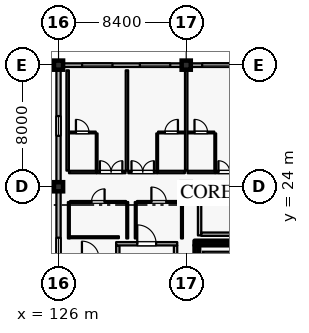
"""IFC4 building model, lengths in metres.
Left out: names, types, materials, properties, quantities, classifications, styles, units other than length and angle.
Written with IfcOpenShell. Run it as: python <this file> out.ifc"""

import sys

from ifc_helpers import new_model, si_unit, direction, frame, frame_2d, origin, origin_2d, place, context, subcontext, project, spatial, rectangle, extrude, element, fill, save


model = new_model("IFC4")
c1 = context("Model", 3, precision=1e-05, world=origin(), true_north=direction((0.0, 1.0)))
c2 = subcontext(c1, "Body", "Model", "MODEL_VIEW")
j1 = project(units=[si_unit("LENGTHUNIT", "METRE"), si_unit("PLANEANGLEUNIT", "RADIAN")], contexts=[c1])
p1 = place(None, origin())
s1 = spatial("IfcSite", under=j1, at=p1, CompositionType="ELEMENT")
p2 = place(p1, origin())
s2 = spatial("IfcBuilding", under=s1, at=p2, CompositionType="ELEMENT")
p3 = place(p2, frame((0.0, 0.0, 47.4)))
s3 = spatial("IfcBuildingStorey", under=s2, at=p3, CompositionType="ELEMENT", Elevation=47.4)
for number, where, z_axis, x_axis in (
    (1, (126.0, 32.0, 0.0), (0.0, 0.0, 1.0), (1.0, 0.0, 0.0)),
    (2, (134.4, 32.0, 0.0), (0.0, 0.0, 1.0), (1.0, 0.0, 0.0)),
    (3, (126.0, 24.0, 0.0), (0.0, 0.0, 1.0), (1.0, 0.0, 0.0)),
    (4, (134.4, 24.0, 0.0), (0.0, 0.0, 1.0), (1.0, 0.0, 0.0)),
):
    element("IfcColumn", number, at=place(p3, frame(where, z_axis=z_axis, x_axis=x_axis)), inside=s3, PredefinedType="COLUMN", context=c2, shape_type="SweptSolid", body=[
        extrude(rectangle(XDim=0.6, YDim=0.6, at=origin_2d()), origin(), (0.0, 0.0, 1.0), 4.2),
    ])
p4 = place(p3, frame((126.3, 32.0, 0.0), z_axis=(0.0, 0.0, 1.0), x_axis=(1.0, 0.0, 0.0)))
e5 = element("IfcWall", 5, at=p4, inside=s3, PredefinedType="SOLIDWALL", context=c2, shape_type="SweptSolid", body=[
    extrude(rectangle(XDim=7.8, YDim=0.24, at=frame_2d((3.9, 0.0))), origin(), (0.0, 0.0, 1.0), 3.49),
])
p5 = place(p4, frame((1.25, 0.0, 0.8)))
e6 = element("IfcOpeningElement", 6, at=p5, cuts=e5, PredefinedType="OPENING", context=c2, shape_type="SweptSolid", body=[
    extrude(rectangle(XDim=2.0, YDim=1.75, at=frame_2d((1.0, 0.875))), frame((0.0, 0.13, 0.0), z_axis=(0.0, -1.0, 0.0), x_axis=(1.0, 0.0, 0.0)), (0.0, 0.0, 1.0), 0.26),
])
p6 = place(p4, frame((5.05, 0.0, 0.8)))
e7 = element("IfcOpeningElement", 7, at=p6, cuts=e5, PredefinedType="OPENING", context=c2, shape_type="SweptSolid", body=[
    extrude(rectangle(XDim=2.0, YDim=1.75, at=frame_2d((1.0, 0.875))), frame((0.0, 0.13, 0.0), z_axis=(0.0, -1.0, 0.0), x_axis=(1.0, 0.0, 0.0)), (0.0, 0.0, 1.0), 0.26),
])
p7 = place(p3, frame((134.7, 32.0, 0.0), z_axis=(0.0, 0.0, 1.0), x_axis=(1.0, 0.0, 0.0)))
e8 = element("IfcWall", 8, at=p7, inside=s3, PredefinedType="SOLIDWALL", context=c2, shape_type="SweptSolid", body=[
    extrude(rectangle(XDim=7.8, YDim=0.24, at=frame_2d((3.9, 0.0))), origin(), (0.0, 0.0, 1.0), 3.49),
])
p8 = place(p7, frame((0.75, 0.0, 0.8)))
e9 = element("IfcOpeningElement", 9, at=p8, cuts=e8, PredefinedType="OPENING", context=c2, shape_type="SweptSolid", body=[
    extrude(rectangle(XDim=2.0, YDim=1.75, at=frame_2d((1.0, 0.875))), frame((0.0, 0.13, 0.0), z_axis=(0.0, -1.0, 0.0), x_axis=(1.0, 0.0, 0.0)), (0.0, 0.0, 1.0), 0.26),
])
p9 = place(p7, frame((4.55, 0.0, 0.8)))
e10 = element("IfcOpeningElement", 10, at=p9, cuts=e8, PredefinedType="OPENING", context=c2, shape_type="SweptSolid", body=[
    extrude(rectangle(XDim=2.0, YDim=1.75, at=frame_2d((1.0, 0.875))), frame((0.0, 0.13, 0.0), z_axis=(0.0, -1.0, 0.0), x_axis=(1.0, 0.0, 0.0)), (0.0, 0.0, 1.0), 0.26),
])
p10 = place(p3, frame((126.0, 16.3, 0.0), z_axis=(0.0, 0.0, 1.0), x_axis=(0.0, 1.0, 0.0)))
e11 = element("IfcWall", 11, at=p10, inside=s3, PredefinedType="SOLIDWALL", context=c2, shape_type="SweptSolid", body=[
    extrude(rectangle(XDim=7.4, YDim=0.28, at=frame_2d((3.7, 0.0))), origin(), (0.0, 0.0, 1.0), 3.3),
])
p11 = place(p10, frame((3.05, 0.0, 0.75)))
e12 = element("IfcOpeningElement", 12, at=p11, cuts=e11, PredefinedType="OPENING", context=c2, shape_type="SweptSolid", body=[
    extrude(rectangle(XDim=1.3, YDim=1.65, at=frame_2d((0.65, 0.825))), frame((0.0, 0.15, 0.0), z_axis=(0.0, -1.0, 0.0), x_axis=(1.0, 0.0, 0.0)), (0.0, 0.0, 1.0), 0.3),
])
p12 = place(p3, frame((126.0, 24.3, 0.0), z_axis=(0.0, 0.0, 1.0), x_axis=(0.0, 1.0, 0.0)))
e13 = element("IfcWall", 13, at=p12, inside=s3, PredefinedType="SOLIDWALL", context=c2, shape_type="SweptSolid", body=[
    extrude(rectangle(XDim=7.4, YDim=0.28, at=frame_2d((3.7, 0.0))), origin(), (0.0, 0.0, 1.0), 3.3),
])
p13 = place(p12, frame((3.05, 0.0, 0.75)))
e14 = element("IfcOpeningElement", 14, at=p13, cuts=e13, PredefinedType="OPENING", context=c2, shape_type="SweptSolid", body=[
    extrude(rectangle(XDim=1.3, YDim=1.65, at=frame_2d((0.65, 0.825))), frame((0.0, 0.15, 0.0), z_axis=(0.0, -1.0, 0.0), x_axis=(1.0, 0.0, 0.0)), (0.0, 0.0, 1.0), 0.3),
])
p14 = place(p3, frame((138.05, 20.3, 0.0), z_axis=(0.0, 0.0, 1.0), x_axis=(-1.0, 0.0, 0.0)))
e15 = element("IfcWall", 15, at=p14, inside=s3, PredefinedType="SHEAR", context=c2, shape_type="SweptSolid", body=[
    extrude(rectangle(XDim=3.1, YDim=0.3, at=frame_2d((1.55, 0.0))), origin(), (0.0, 0.0, 1.0), 3.935),
])
p15 = place(p3, frame((135.1, 20.145, 0.0), z_axis=(0.0, 0.0, 1.0), x_axis=(0.0, -1.0, 0.0)))
e16 = element("IfcWall", 16, at=p15, inside=s3, PredefinedType="SHEAR", context=c2, shape_type="SweptSolid", body=[
    extrude(rectangle(XDim=2.59, YDim=0.3, at=frame_2d((1.295, 0.0))), origin(), (0.0, 0.0, 1.0), 3.935),
])
p16 = place(p3, frame((129.9, 19.415, 0.0), z_axis=(0.0, 0.0, 1.0), x_axis=(0.0, 1.0, 0.0)))
e17 = element("IfcWall", 17, at=p16, inside=s3, PredefinedType="PARTITIONING", context=c2, shape_type="SweptSolid", body=[
    extrude(rectangle(XDim=0.72, YDim=0.22, at=frame_2d((0.36, 0.0))), origin(), (0.0, 0.0, 1.0), 3.935),
])
p17 = place(p3, frame((133.7, 16.605, 0.0), z_axis=(0.0, 0.0, 1.0), x_axis=(0.0, 1.0, 0.0)))
e18 = element("IfcWall", 18, at=p17, inside=s3, PredefinedType="PARTITIONING", context=c2, shape_type="SweptSolid", body=[
    extrude(rectangle(XDim=3.53, YDim=0.22, at=frame_2d((1.765, 0.0))), origin(), (0.0, 0.0, 1.0), 3.935),
])
p18 = place(p3, frame((129.79, 20.25, 0.0), z_axis=(0.0, 0.0, 1.0), x_axis=(1.0, 0.0, 0.0)))
e19 = element("IfcWall", 19, at=p18, inside=s3, PredefinedType="PARTITIONING", context=c2, shape_type="SweptSolid", body=[
    extrude(rectangle(XDim=4.02, YDim=0.22, at=frame_2d((2.01, 0.0))), origin(), (0.0, 0.0, 1.0), 3.935),
])
p19 = place(p18, frame((1.39, 0.0, 0.0)))
e20 = element("IfcOpeningElement", 20, at=p19, cuts=e19, PredefinedType="OPENING", context=c2, shape_type="SweptSolid", body=[
    extrude(rectangle(XDim=1.24, YDim=2.2, at=frame_2d((0.62, 1.1))), frame((0.0, 0.12, 0.0), z_axis=(0.0, -1.0, 0.0), x_axis=(1.0, 0.0, 0.0)), (0.0, 0.0, 1.0), 0.24),
])
p20 = place(p3, frame((126.69, 24.97, 0.0), z_axis=(0.0, 0.0, 1.0), x_axis=(1.0, 0.0, 0.0)))
e21 = element("IfcWall", 21, at=p20, inside=s3, PredefinedType="PARTITIONING", context=c2, shape_type="SweptSolid", body=[
    extrude(rectangle(XDim=1.81, YDim=0.16, at=frame_2d((0.905, 0.0))), origin(), (0.0, 0.0, 1.0), 3.935),
])
p21 = place(p3, frame((128.51, 24.97, 0.0), z_axis=(0.0, 0.0, 1.0), x_axis=(1.0, 0.0, 0.0)))
e22 = element("IfcWall", 22, at=p21, inside=s3, PredefinedType="PARTITIONING", context=c2, shape_type="SweptSolid", body=[
    extrude(rectangle(XDim=1.9, YDim=0.16, at=frame_2d((0.95, 0.0))), origin(), (0.0, 0.0, 1.0), 3.935),
])
p22 = place(p21, frame((0.21, 0.0, 0.0)))
e23 = element("IfcOpeningElement", 23, at=p22, cuts=e22, PredefinedType="OPENING", context=c2, shape_type="SweptSolid", body=[
    extrude(rectangle(XDim=1.48, YDim=2.35, at=frame_2d((0.74, 1.175))), frame((0.0, 0.09, 0.0), z_axis=(0.0, -1.0, 0.0), x_axis=(1.0, 0.0, 0.0)), (0.0, 0.0, 1.0), 0.18),
])
p23 = place(p3, frame((128.51, 25.06, 0.0), z_axis=(0.0, 0.0, 1.0), x_axis=(0.0, 1.0, 0.0)))
e24 = element("IfcWall", 24, at=p23, inside=s3, PredefinedType="PARTITIONING", context=c2, shape_type="SweptSolid", body=[
    extrude(rectangle(XDim=2.45, YDim=0.115, at=frame_2d((1.225, 0.0))), origin(), (0.0, 0.0, 1.0), 3.935),
])
p24 = place(p3, frame((126.7, 27.57, 0.0), z_axis=(0.0, 0.0, 1.0), x_axis=(1.0, 0.0, 0.0)))
e25 = element("IfcWall", 25, at=p24, inside=s3, PredefinedType="PARTITIONING", context=c2, shape_type="SweptSolid", body=[
    extrude(rectangle(XDim=1.75, YDim=0.115, at=frame_2d((0.875, 0.0))), origin(), (0.0, 0.0, 1.0), 3.935),
])
p25 = place(p24, frame((0.445, 0.0, 0.0)))
e26 = element("IfcOpeningElement", 26, at=p25, cuts=e25, PredefinedType="OPENING", context=c2, shape_type="SweptSolid", body=[
    extrude(rectangle(XDim=0.86, YDim=2.12, at=frame_2d((0.43, 1.06))), frame((0.0, 0.067, 0.0), z_axis=(0.0, -1.0, 0.0), x_axis=(1.0, 0.0, 0.0)), (0.0, 0.0, 1.0), 0.135),
])
p26 = place(p3, frame((126.6, 25.06, 0.0), z_axis=(0.0, 0.0, 1.0), x_axis=(0.0, 1.0, 0.0)))
e27 = element("IfcWall", 27, at=p26, inside=s3, PredefinedType="PARTITIONING", context=c2, shape_type="SweptSolid", body=[
    extrude(rectangle(XDim=6.6, YDim=0.16, at=frame_2d((3.3, 0.0))), origin(), (0.0, 0.0, 1.0), 3.935),
])
p27 = place(p3, frame((130.59, 24.97, 0.0), z_axis=(0.0, 0.0, 1.0), x_axis=(1.0, 0.0, 0.0)))
e28 = element("IfcWall", 28, at=p27, inside=s3, PredefinedType="PARTITIONING", context=c2, shape_type="SweptSolid", body=[
    extrude(rectangle(XDim=1.9, YDim=0.16, at=frame_2d((0.95, 0.0))), origin(), (0.0, 0.0, 1.0), 3.935),
])
p28 = place(p27, frame((0.21, 0.0, 0.0)))
e29 = element("IfcOpeningElement", 29, at=p28, cuts=e28, PredefinedType="OPENING", context=c2, shape_type="SweptSolid", body=[
    extrude(rectangle(XDim=1.48, YDim=2.35, at=frame_2d((0.74, 1.175))), frame((0.0, 0.09, 0.0), z_axis=(0.0, -1.0, 0.0), x_axis=(1.0, 0.0, 0.0)), (0.0, 0.0, 1.0), 0.18),
])
p29 = place(p3, frame((132.5, 24.97, 0.0), z_axis=(0.0, 0.0, 1.0), x_axis=(1.0, 0.0, 0.0)))
e30 = element("IfcWall", 30, at=p29, inside=s3, PredefinedType="PARTITIONING", context=c2, shape_type="SweptSolid", body=[
    extrude(rectangle(XDim=1.81, YDim=0.16, at=frame_2d((0.905, 0.0))), origin(), (0.0, 0.0, 1.0), 3.935),
])
p30 = place(p3, frame((132.49, 25.06, 0.0), z_axis=(0.0, 0.0, 1.0), x_axis=(0.0, 1.0, 0.0)))
e31 = element("IfcWall", 31, at=p30, inside=s3, PredefinedType="PARTITIONING", context=c2, shape_type="SweptSolid", body=[
    extrude(rectangle(XDim=2.45, YDim=0.115, at=frame_2d((1.225, 0.0))), origin(), (0.0, 0.0, 1.0), 3.935),
])
p31 = place(p3, frame((132.55, 27.57, 0.0), z_axis=(0.0, 0.0, 1.0), x_axis=(1.0, 0.0, 0.0)))
e32 = element("IfcWall", 32, at=p31, inside=s3, PredefinedType="PARTITIONING", context=c2, shape_type="SweptSolid", body=[
    extrude(rectangle(XDim=1.75, YDim=0.115, at=frame_2d((0.875, 0.0))), origin(), (0.0, 0.0, 1.0), 3.935),
])
p32 = place(p31, frame((0.445, 0.0, 0.0)))
e33 = element("IfcOpeningElement", 33, at=p32, cuts=e32, PredefinedType="OPENING", context=c2, shape_type="SweptSolid", body=[
    extrude(rectangle(XDim=0.86, YDim=2.12, at=frame_2d((0.43, 1.06))), frame((0.0, 0.067, 0.0), z_axis=(0.0, -1.0, 0.0), x_axis=(1.0, 0.0, 0.0)), (0.0, 0.0, 1.0), 0.135),
])
p33 = place(p3, frame((130.5, 25.06, 0.0), z_axis=(0.0, 0.0, 1.0), x_axis=(0.0, 1.0, 0.0)))
e34 = element("IfcWall", 34, at=p33, inside=s3, PredefinedType="PARTITIONING", context=c2, shape_type="SweptSolid", body=[
    extrude(rectangle(XDim=6.6, YDim=0.16, at=frame_2d((3.3, 0.0))), origin(), (0.0, 0.0, 1.0), 3.935),
])
p34 = place(p3, frame((134.49, 24.97, 0.0), z_axis=(0.0, 0.0, 1.0), x_axis=(1.0, 0.0, 0.0)))
e35 = element("IfcWall", 35, at=p34, inside=s3, PredefinedType="PARTITIONING", context=c2, shape_type="SweptSolid", body=[
    extrude(rectangle(XDim=1.81, YDim=0.16, at=frame_2d((0.905, 0.0))), origin(), (0.0, 0.0, 1.0), 3.935),
])
p35 = place(p3, frame((136.31, 24.97, 0.0), z_axis=(0.0, 0.0, 1.0), x_axis=(1.0, 0.0, 0.0)))
e36 = element("IfcWall", 36, at=p35, inside=s3, PredefinedType="PARTITIONING", context=c2, shape_type="SweptSolid", body=[
    extrude(rectangle(XDim=1.9, YDim=0.16, at=frame_2d((0.95, 0.0))), origin(), (0.0, 0.0, 1.0), 3.935),
])
p36 = place(p35, frame((0.21, 0.0, 0.0)))
e37 = element("IfcOpeningElement", 37, at=p36, cuts=e36, PredefinedType="OPENING", context=c2, shape_type="SweptSolid", body=[
    extrude(rectangle(XDim=1.48, YDim=2.35, at=frame_2d((0.74, 1.175))), frame((0.0, 0.09, 0.0), z_axis=(0.0, -1.0, 0.0), x_axis=(1.0, 0.0, 0.0)), (0.0, 0.0, 1.0), 0.18),
])
p37 = place(p3, frame((136.31, 25.06, 0.0), z_axis=(0.0, 0.0, 1.0), x_axis=(0.0, 1.0, 0.0)))
e38 = element("IfcWall", 38, at=p37, inside=s3, PredefinedType="PARTITIONING", context=c2, shape_type="SweptSolid", body=[
    extrude(rectangle(XDim=2.45, YDim=0.115, at=frame_2d((1.225, 0.0))), origin(), (0.0, 0.0, 1.0), 3.935),
])
p38 = place(p3, frame((134.5, 27.57, 0.0), z_axis=(0.0, 0.0, 1.0), x_axis=(1.0, 0.0, 0.0)))
e39 = element("IfcWall", 39, at=p38, inside=s3, PredefinedType="PARTITIONING", context=c2, shape_type="SweptSolid", body=[
    extrude(rectangle(XDim=1.75, YDim=0.115, at=frame_2d((0.875, 0.0))), origin(), (0.0, 0.0, 1.0), 3.935),
])
p39 = place(p38, frame((0.445, 0.0, 0.0)))
e40 = element("IfcOpeningElement", 40, at=p39, cuts=e39, PredefinedType="OPENING", context=c2, shape_type="SweptSolid", body=[
    extrude(rectangle(XDim=0.86, YDim=2.12, at=frame_2d((0.43, 1.06))), frame((0.0, 0.067, 0.0), z_axis=(0.0, -1.0, 0.0), x_axis=(1.0, 0.0, 0.0)), (0.0, 0.0, 1.0), 0.135),
])
p40 = place(p3, frame((134.4, 25.06, 0.0), z_axis=(0.0, 0.0, 1.0), x_axis=(0.0, 1.0, 0.0)))
e41 = element("IfcWall", 41, at=p40, inside=s3, PredefinedType="PARTITIONING", context=c2, shape_type="SweptSolid", body=[
    extrude(rectangle(XDim=6.6, YDim=0.16, at=frame_2d((3.3, 0.0))), origin(), (0.0, 0.0, 1.0), 3.29),
])
p41 = place(p3, frame((135.36, 23.2, 0.0), z_axis=(0.0, 0.0, 1.0), x_axis=(1.0, 0.0, 0.0)))
e42 = element("IfcWall", 42, at=p41, inside=s3, PredefinedType="PARTITIONING", context=c2, shape_type="SweptSolid", body=[
    extrude(rectangle(XDim=6.48, YDim=0.22, at=frame_2d((3.24, 0.0))), origin(), (0.0, 0.0, 1.0), 3.935),
])
p42 = place(p41, frame((2.49, 0.0, 0.0)))
e43 = element("IfcOpeningElement", 43, at=p42, cuts=e42, PredefinedType="OPENING", context=c2, shape_type="SweptSolid", body=[
    extrude(rectangle(XDim=1.5, YDim=2.3, at=frame_2d((0.75, 1.15))), frame((0.0, 0.12, 0.0), z_axis=(0.0, -1.0, 0.0), x_axis=(1.0, 0.0, 0.0)), (0.0, 0.0, 1.0), 0.24),
])
p43 = place(p3, frame((126.76, 23.0, 0.0), z_axis=(0.0, 0.0, 1.0), x_axis=(1.0, 0.0, 0.0)))
e44 = element("IfcWall", 44, at=p43, inside=s3, PredefinedType="PARTITIONING", context=c2, shape_type="SweptSolid", body=[
    extrude(rectangle(XDim=3.68, YDim=0.125, at=frame_2d((1.84, 0.0))), origin(), (0.0, 0.0, 1.0), 3.935),
])
p44 = place(p43, frame((1.41, 0.0, 0.0)))
e45 = element("IfcOpeningElement", 45, at=p44, cuts=e44, PredefinedType="OPENING", context=c2, shape_type="SweptSolid", body=[
    extrude(rectangle(XDim=0.86, YDim=2.12, at=frame_2d((0.43, 1.06))), frame((0.0, 0.073, 0.0), z_axis=(0.0, -1.0, 0.0), x_axis=(1.0, 0.0, 0.0)), (0.0, 0.0, 1.0), 0.145),
])
p45 = place(p3, frame((131.16, 23.0, 0.0), z_axis=(0.0, 0.0, 1.0), x_axis=(1.0, 0.0, 0.0)))
e46 = element("IfcWall", 46, at=p45, inside=s3, PredefinedType="PARTITIONING", context=c2, shape_type="SweptSolid", body=[
    extrude(rectangle(XDim=2.88, YDim=0.125, at=frame_2d((1.44, 0.0))), origin(), (0.0, 0.0, 1.0), 3.935),
])
p46 = place(p45, frame((0.95, 0.0, 0.0)))
e47 = element("IfcOpeningElement", 47, at=p46, cuts=e46, PredefinedType="OPENING", context=c2, shape_type="SweptSolid", body=[
    extrude(rectangle(XDim=0.98, YDim=2.15, at=frame_2d((0.49, 1.075))), frame((0.0, 0.073, 0.0), z_axis=(0.0, -1.0, 0.0), x_axis=(1.0, 0.0, 0.0)), (0.0, 0.0, 1.0), 0.145),
])
p47 = place(p3, frame((135.28, 20.8, 0.0), z_axis=(0.0, 0.0, 1.0), x_axis=(0.0, 1.0, 0.0)))
e48 = element("IfcWall", 48, at=p47, inside=s3, PredefinedType="PARTITIONING", context=c2, shape_type="SweptSolid", body=[
    extrude(rectangle(XDim=2.348, YDim=0.22, at=frame_2d((1.174, 0.0))), origin(), (0.0, 0.0, 1.0), 3.935),
])
p48 = place(p3, frame((135.39, 20.88, 0.0), z_axis=(0.0, 0.0, 1.0), x_axis=(1.0, 0.0, 0.0)))
e49 = element("IfcWall", 49, at=p48, inside=s3, PredefinedType="PARTITIONING", context=c2, shape_type="SweptSolid", body=[
    extrude(rectangle(XDim=6.42, YDim=0.22, at=frame_2d((3.21, 0.0))), origin(), (0.0, 0.0, 1.0), 3.935),
])
for number, where, z_axis, x_axis in (
    (50, (126.68, 20.6, 0.0), (0.0, 0.0, 1.0), (0.0, 1.0, 0.0)),
    (51, (130.52, 20.6, 0.0), (0.0, 0.0, 1.0), (0.0, 1.0, 0.0)),
):
    element("IfcWall", number, at=place(p3, frame(where, z_axis=z_axis, x_axis=x_axis)), inside=s3, PredefinedType="PARTITIONING", context=c2, shape_type="SweptSolid", body=[
        extrude(rectangle(XDim=2.396, YDim=0.125, at=frame_2d((1.198, 0.0))), origin(), (0.0, 0.0, 1.0), 3.935),
    ])
p49 = place(p3, frame((126.742, 20.68, 0.0), z_axis=(0.0, 0.0, 1.0), x_axis=(1.0, 0.0, 0.0)))
e52 = element("IfcWall", 52, at=p49, inside=s3, PredefinedType="PARTITIONING", context=c2, shape_type="SweptSolid", body=[
    extrude(rectangle(XDim=3.228, YDim=0.125, at=frame_2d((1.614, 0.0))), origin(), (0.0, 0.0, 1.0), 3.935),
])
for number, where, z_axis, x_axis in (
    (53, (131.08, 20.6, 0.0), (0.0, 0.0, 1.0), (0.0, 1.0, 0.0)),
    (54, (134.12, 20.6, 0.0), (0.0, 0.0, 1.0), (0.0, 1.0, 0.0)),
):
    element("IfcWall", number, at=place(p3, frame(where, z_axis=z_axis, x_axis=x_axis)), inside=s3, PredefinedType="PARTITIONING", context=c2, shape_type="SweptSolid", body=[
        extrude(rectangle(XDim=2.396, YDim=0.125, at=frame_2d((1.198, 0.0))), origin(), (0.0, 0.0, 1.0), 3.935),
    ])
p50 = place(p5, origin())
e55 = element("IfcWindow", 55, at=p50, inside=s3, PartitioningType="DOUBLE_PANEL_VERTICAL", PredefinedType="WINDOW", context=c2, shape_type="SweptSolid", body=[
    extrude(rectangle(XDim=2.0, YDim=1.75, at=frame_2d((1.0, 0.875))), frame((0.0, 0.03, 0.0), z_axis=(0.0, -1.0, 0.0), x_axis=(1.0, 0.0, 0.0)), (0.0, 0.0, 1.0), 0.06),
])
fill(e6, e55)
p51 = place(p6, origin())
e56 = element("IfcWindow", 56, at=p51, inside=s3, PartitioningType="DOUBLE_PANEL_VERTICAL", PredefinedType="WINDOW", context=c2, shape_type="SweptSolid", body=[
    extrude(rectangle(XDim=2.0, YDim=1.75, at=frame_2d((1.0, 0.875))), frame((0.0, 0.03, 0.0), z_axis=(0.0, -1.0, 0.0), x_axis=(1.0, 0.0, 0.0)), (0.0, 0.0, 1.0), 0.06),
])
fill(e7, e56)
p52 = place(p8, origin())
e57 = element("IfcWindow", 57, at=p52, inside=s3, PartitioningType="DOUBLE_PANEL_VERTICAL", PredefinedType="WINDOW", context=c2, shape_type="SweptSolid", body=[
    extrude(rectangle(XDim=2.0, YDim=1.75, at=frame_2d((1.0, 0.875))), frame((0.0, 0.03, 0.0), z_axis=(0.0, -1.0, 0.0), x_axis=(1.0, 0.0, 0.0)), (0.0, 0.0, 1.0), 0.06),
])
fill(e9, e57)
p53 = place(p11, origin())
e58 = element("IfcWindow", 58, at=p53, inside=s3, PartitioningType="SINGLE_PANEL", PredefinedType="WINDOW", context=c2, shape_type="SweptSolid", body=[
    extrude(rectangle(XDim=1.3, YDim=1.65, at=frame_2d((0.65, 0.825))), frame((0.0, 0.03, 0.0), z_axis=(0.0, -1.0, 0.0), x_axis=(1.0, 0.0, 0.0)), (0.0, 0.0, 1.0), 0.06),
])
fill(e12, e58)
p54 = place(p13, origin())
e59 = element("IfcWindow", 59, at=p54, inside=s3, PartitioningType="SINGLE_PANEL", PredefinedType="WINDOW", context=c2, shape_type="SweptSolid", body=[
    extrude(rectangle(XDim=1.3, YDim=1.65, at=frame_2d((0.65, 0.825))), frame((0.0, 0.03, 0.0), z_axis=(0.0, -1.0, 0.0), x_axis=(1.0, 0.0, 0.0)), (0.0, 0.0, 1.0), 0.06),
])
fill(e14, e59)
p55 = place(p19, origin())
e60 = element("IfcDoor", 60, at=p55, inside=s3, OperationType="SINGLE_SWING_LEFT", PredefinedType="DOOR", context=c2, shape_type="SweptSolid", body=[
    extrude(rectangle(XDim=1.24, YDim=2.2, at=frame_2d((0.62, 1.1))), frame((0.0, 0.025, 0.0), z_axis=(0.0, -1.0, 0.0), x_axis=(1.0, 0.0, 0.0)), (0.0, 0.0, 1.0), 0.05),
])
fill(e20, e60)
p56 = place(p22, origin())
e61 = element("IfcDoor", 61, at=p56, inside=s3, OperationType="DOUBLE_DOOR_SINGLE_SWING", PredefinedType="DOOR", context=c2, shape_type="SweptSolid", body=[
    extrude(rectangle(XDim=1.48, YDim=2.35, at=frame_2d((0.74, 1.175))), frame((0.0, 0.025, 0.0), z_axis=(0.0, -1.0, 0.0), x_axis=(1.0, 0.0, 0.0)), (0.0, 0.0, 1.0), 0.05),
])
fill(e23, e61)
p57 = place(p25, origin())
e62 = element("IfcDoor", 62, at=p57, inside=s3, OperationType="SINGLE_SWING_LEFT", PredefinedType="DOOR", context=c2, shape_type="SweptSolid", body=[
    extrude(rectangle(XDim=0.86, YDim=2.12, at=frame_2d((0.43, 1.06))), frame((0.0, 0.025, 0.0), z_axis=(0.0, -1.0, 0.0), x_axis=(1.0, 0.0, 0.0)), (0.0, 0.0, 1.0), 0.05),
])
fill(e26, e62)
p58 = place(p28, origin())
e63 = element("IfcDoor", 63, at=p58, inside=s3, OperationType="DOUBLE_DOOR_SINGLE_SWING", PredefinedType="DOOR", context=c2, shape_type="SweptSolid", body=[
    extrude(rectangle(XDim=1.48, YDim=2.35, at=frame_2d((0.74, 1.175))), frame((0.0, 0.025, 0.0), z_axis=(0.0, -1.0, 0.0), x_axis=(1.0, 0.0, 0.0)), (0.0, 0.0, 1.0), 0.05),
])
fill(e29, e63)
p59 = place(p32, origin())
e64 = element("IfcDoor", 64, at=p59, inside=s3, OperationType="SINGLE_SWING_RIGHT", PredefinedType="DOOR", context=c2, shape_type="SweptSolid", body=[
    extrude(rectangle(XDim=0.86, YDim=2.12, at=frame_2d((0.43, 1.06))), frame((0.0, 0.025, 0.0), z_axis=(0.0, -1.0, 0.0), x_axis=(1.0, 0.0, 0.0)), (0.0, 0.0, 1.0), 0.05),
])
fill(e33, e64)
p60 = place(p36, origin())
e65 = element("IfcDoor", 65, at=p60, inside=s3, OperationType="DOUBLE_DOOR_SINGLE_SWING", PredefinedType="DOOR", context=c2, shape_type="SweptSolid", body=[
    extrude(rectangle(XDim=1.48, YDim=2.35, at=frame_2d((0.74, 1.175))), frame((0.0, 0.025, 0.0), z_axis=(0.0, -1.0, 0.0), x_axis=(1.0, 0.0, 0.0)), (0.0, 0.0, 1.0), 0.05),
])
fill(e37, e65)
p61 = place(p39, origin())
e66 = element("IfcDoor", 66, at=p61, inside=s3, OperationType="SINGLE_SWING_LEFT", PredefinedType="DOOR", context=c2, shape_type="SweptSolid", body=[
    extrude(rectangle(XDim=0.86, YDim=2.12, at=frame_2d((0.43, 1.06))), frame((0.0, 0.025, 0.0), z_axis=(0.0, -1.0, 0.0), x_axis=(1.0, 0.0, 0.0)), (0.0, 0.0, 1.0), 0.05),
])
fill(e40, e66)
p62 = place(p44, origin())
e67 = element("IfcDoor", 67, at=p62, inside=s3, OperationType="SINGLE_SWING_RIGHT", PredefinedType="DOOR", context=c2, shape_type="SweptSolid", body=[
    extrude(rectangle(XDim=0.86, YDim=2.12, at=frame_2d((0.43, 1.06))), frame((0.0, 0.025, 0.0), z_axis=(0.0, -1.0, 0.0), x_axis=(1.0, 0.0, 0.0)), (0.0, 0.0, 1.0), 0.05),
])
fill(e45, e67)
p63 = place(p46, origin())
e68 = element("IfcDoor", 68, at=p63, inside=s3, OperationType="SINGLE_SWING_LEFT", PredefinedType="DOOR", context=c2, shape_type="SweptSolid", body=[
    extrude(rectangle(XDim=0.98, YDim=2.15, at=frame_2d((0.49, 1.075))), frame((0.0, 0.025, 0.0), z_axis=(0.0, -1.0, 0.0), x_axis=(1.0, 0.0, 0.0)), (0.0, 0.0, 1.0), 0.05),
])
fill(e47, e68)
save(model, sys.argv[1])
